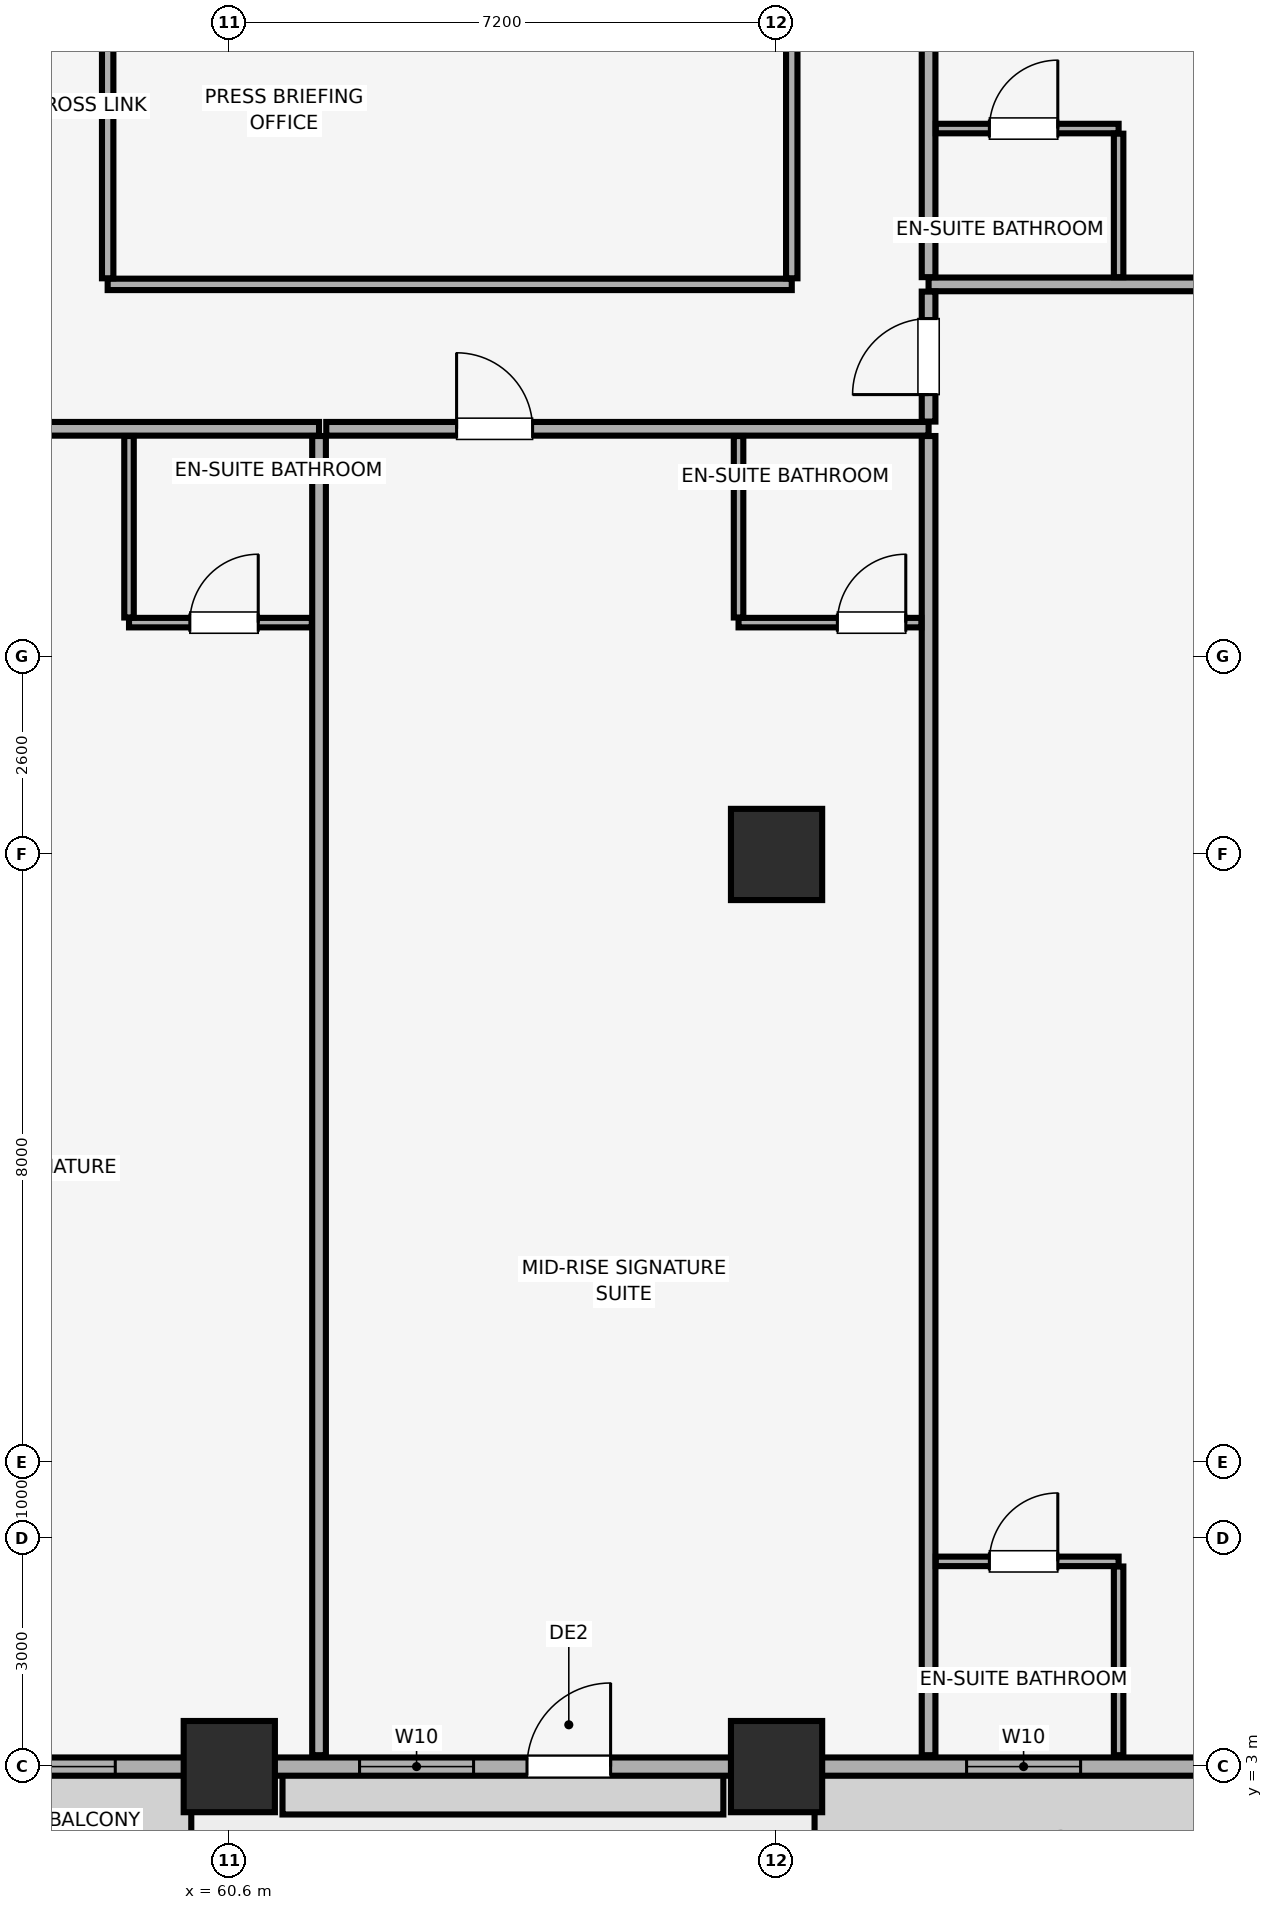
"""IFC4 building model, lengths in metres.
Left out: names, types, materials, properties, quantities, classifications, styles, units other than length and angle.
Written with IfcOpenShell. Run it as: python <this file> out.ifc"""

import sys

from ifc_helpers import new_model, si_unit, direction, frame, frame_2d, origin, origin_2d, place, context, subcontext, project, spatial, rectangle, extrude, element, fill, save


model = new_model("IFC4")
c1 = context("Model", 3, precision=1e-05, world=origin(), true_north=direction((0.0, 1.0)))
c2 = subcontext(c1, "Body", "Model", "MODEL_VIEW")
j1 = project(units=[si_unit("LENGTHUNIT", "METRE"), si_unit("PLANEANGLEUNIT", "RADIAN")], contexts=[c1])
p1 = place(None, origin())
s1 = spatial("IfcSite", under=j1, at=p1, CompositionType="ELEMENT")
p2 = place(p1, origin())
s2 = spatial("IfcBuilding", under=s1, at=p2, CompositionType="ELEMENT")
p3 = place(p2, frame((0.0, 0.0, 180.95)))
s3 = spatial("IfcBuildingStorey", under=s2, at=p3, CompositionType="ELEMENT", Elevation=180.95)
for number, where, z_axis, x_axis in (
    (1, (60.6, 3.0, 0.0), (0.0, 0.0, 1.0), (1.0, 0.0, 0.0)),
    (2, (67.8, 3.0, 0.0), (0.0, 0.0, 1.0), (1.0, 0.0, 0.0)),
    (3, (67.8, 15.0, 0.0), (0.0, 0.0, 1.0), (1.0, 0.0, 0.0)),
):
    element("IfcColumn", number, at=place(p3, frame(where, z_axis=z_axis, x_axis=x_axis)), inside=s3, PredefinedType="COLUMN", context=c2, shape_type="SweptSolid", body=[
        extrude(rectangle(XDim=1.2, YDim=1.2, at=origin_2d()), origin(), (0.0, 0.0, 1.0), 3.45),
    ])
p4 = place(p3, frame((7.0, 3.0, 0.0), z_axis=(0.0, 0.0, 1.0), x_axis=(1.0, 0.0, 0.0)))
e4 = element("IfcWall", 4, at=p4, inside=s3, PredefinedType="SOLIDWALL", context=c2, shape_type="SweptSolid", body=[
    extrude(rectangle(XDim=70.0, YDim=0.24, at=frame_2d((35.0, 0.0))), origin(), (0.0, 0.0, 1.0), 2.65),
])
p5 = place(p4, frame((11.383, 0.0, 0.0)))
e5 = element("IfcOpeningElement", 5, at=p5, cuts=e4, PredefinedType="OPENING", context=c2, shape_type="SweptSolid", body=[
    extrude(rectangle(XDim=1.1, YDim=2.15, at=frame_2d((0.55, 1.075))), frame((0.0, 0.13, 0.0), z_axis=(0.0, -1.0, 0.0), x_axis=(1.0, 0.0, 0.0)), (0.0, 0.0, 1.0), 0.26),
])
p6 = place(p4, frame((34.45, 0.0, 0.0)))
e6 = element("IfcOpeningElement", 6, at=p6, cuts=e4, PredefinedType="OPENING", context=c2, shape_type="SweptSolid", body=[
    extrude(rectangle(XDim=1.1, YDim=2.15, at=frame_2d((0.55, 1.075))), frame((0.0, 0.13, 0.0), z_axis=(0.0, -1.0, 0.0), x_axis=(1.0, 0.0, 0.0)), (0.0, 0.0, 1.0), 0.26),
])
p7 = place(p4, frame((57.517, 0.0, 0.0)))
e7 = element("IfcOpeningElement", 7, at=p7, cuts=e4, PredefinedType="OPENING", context=c2, shape_type="SweptSolid", body=[
    extrude(rectangle(XDim=1.1, YDim=2.15, at=frame_2d((0.55, 1.075))), frame((0.0, 0.13, 0.0), z_axis=(0.0, -1.0, 0.0), x_axis=(1.0, 0.0, 0.0)), (0.0, 0.0, 1.0), 0.26),
])
p8 = place(p4, frame((5.2, 0.0, 0.85)))
e8 = element("IfcOpeningElement", 8, at=p8, cuts=e4, PredefinedType="OPENING", context=c2, shape_type="SweptSolid", body=[
    extrude(rectangle(XDim=1.5, YDim=1.4, at=frame_2d((0.75, 0.7))), frame((0.0, 0.13, 0.0), z_axis=(0.0, -1.0, 0.0), x_axis=(1.0, 0.0, 0.0)), (0.0, 0.0, 1.0), 0.26),
])
p9 = place(p4, frame((13.133, 0.0, 0.85)))
e9 = element("IfcOpeningElement", 9, at=p9, cuts=e4, PredefinedType="OPENING", context=c2, shape_type="SweptSolid", body=[
    extrude(rectangle(XDim=1.5, YDim=1.4, at=frame_2d((0.75, 0.7))), frame((0.0, 0.13, 0.0), z_axis=(0.0, -1.0, 0.0), x_axis=(1.0, 0.0, 0.0)), (0.0, 0.0, 1.0), 0.26),
])
p10 = place(p4, frame((17.812, 0.0, 0.85)))
e10 = element("IfcOpeningElement", 10, at=p10, cuts=e4, PredefinedType="OPENING", context=c2, shape_type="SweptSolid", body=[
    extrude(rectangle(XDim=4.2, YDim=1.65, at=frame_2d((2.1, 0.825))), frame((0.0, 0.13, 0.0), z_axis=(0.0, -1.0, 0.0), x_axis=(1.0, 0.0, 0.0)), (0.0, 0.0, 1.0), 0.26),
])
p11 = place(p4, frame((25.1, 0.0, 0.85)))
e11 = element("IfcOpeningElement", 11, at=p11, cuts=e4, PredefinedType="OPENING", context=c2, shape_type="SweptSolid", body=[
    extrude(rectangle(XDim=4.2, YDim=1.65, at=frame_2d((2.1, 0.825))), frame((0.0, 0.13, 0.0), z_axis=(0.0, -1.0, 0.0), x_axis=(1.0, 0.0, 0.0)), (0.0, 0.0, 1.0), 0.26),
])
p12 = place(p4, frame((31.99, 0.0, 0.85)))
e12 = element("IfcOpeningElement", 12, at=p12, cuts=e4, PredefinedType="OPENING", context=c2, shape_type="SweptSolid", body=[
    extrude(rectangle(XDim=1.5, YDim=1.4, at=frame_2d((0.75, 0.7))), frame((0.0, 0.13, 0.0), z_axis=(0.0, -1.0, 0.0), x_axis=(1.0, 0.0, 0.0)), (0.0, 0.0, 1.0), 0.26),
])
p13 = place(p4, frame((36.51, 0.0, 0.85)))
e13 = element("IfcOpeningElement", 13, at=p13, cuts=e4, PredefinedType="OPENING", context=c2, shape_type="SweptSolid", body=[
    extrude(rectangle(XDim=1.5, YDim=1.4, at=frame_2d((0.75, 0.7))), frame((0.0, 0.13, 0.0), z_axis=(0.0, -1.0, 0.0), x_axis=(1.0, 0.0, 0.0)), (0.0, 0.0, 1.0), 0.26),
])
p14 = place(p4, frame((40.7, 0.0, 0.85)))
e14 = element("IfcOpeningElement", 14, at=p14, cuts=e4, PredefinedType="OPENING", context=c2, shape_type="SweptSolid", body=[
    extrude(rectangle(XDim=4.2, YDim=1.65, at=frame_2d((2.1, 0.825))), frame((0.0, 0.13, 0.0), z_axis=(0.0, -1.0, 0.0), x_axis=(1.0, 0.0, 0.0)), (0.0, 0.0, 1.0), 0.26),
])
p15 = place(p4, frame((47.9, 0.0, 0.85)))
e15 = element("IfcOpeningElement", 15, at=p15, cuts=e4, PredefinedType="OPENING", context=c2, shape_type="SweptSolid", body=[
    extrude(rectangle(XDim=4.2, YDim=1.65, at=frame_2d((2.1, 0.825))), frame((0.0, 0.13, 0.0), z_axis=(0.0, -1.0, 0.0), x_axis=(1.0, 0.0, 0.0)), (0.0, 0.0, 1.0), 0.26),
])
p16 = place(p4, frame((55.314, 0.0, 0.85)))
e16 = element("IfcOpeningElement", 16, at=p16, cuts=e4, PredefinedType="OPENING", context=c2, shape_type="SweptSolid", body=[
    extrude(rectangle(XDim=1.5, YDim=1.4, at=frame_2d((0.75, 0.7))), frame((0.0, 0.13, 0.0), z_axis=(0.0, -1.0, 0.0), x_axis=(1.0, 0.0, 0.0)), (0.0, 0.0, 1.0), 0.26),
])
p17 = place(p4, frame((63.3, 0.0, 0.85)))
e17 = element("IfcOpeningElement", 17, at=p17, cuts=e4, PredefinedType="OPENING", context=c2, shape_type="SweptSolid", body=[
    extrude(rectangle(XDim=1.5, YDim=1.4, at=frame_2d((0.75, 0.7))), frame((0.0, 0.13, 0.0), z_axis=(0.0, -1.0, 0.0), x_axis=(1.0, 0.0, 0.0)), (0.0, 0.0, 1.0), 0.26),
])
p18 = place(p3, frame((53.856, 20.6, 0.0), z_axis=(0.0, 0.0, 1.0), x_axis=(1.0, 0.0, 0.0)))
e18 = element("IfcWall", 18, at=p18, inside=s3, PredefinedType="PARTITIONING", context=c2, shape_type="SweptSolid", body=[
    extrude(rectangle(XDim=7.924, YDim=0.18, at=frame_2d((3.962, 0.0))), origin(), (0.0, 0.0, 1.0), 3.45),
])
p19 = place(p18, frame((1.924, 0.0, 0.0)))
e19 = element("IfcOpeningElement", 19, at=p19, cuts=e18, PredefinedType="OPENING", context=c2, shape_type="SweptSolid", body=[
    extrude(rectangle(XDim=1.0, YDim=2.15, at=frame_2d((0.5, 1.075))), frame((0.0, 0.1, 0.0), z_axis=(0.0, -1.0, 0.0), x_axis=(1.0, 0.0, 0.0)), (0.0, 0.0, 1.0), 0.2),
])
p20 = place(p3, frame((61.781, 3.15, 0.0), z_axis=(0.0, 0.0, 1.0), x_axis=(0.0, 1.0, 0.0)))
e20 = element("IfcWall", 20, at=p20, inside=s3, PredefinedType="PARTITIONING", context=c2, shape_type="SweptSolid", body=[
    extrude(rectangle(XDim=17.355, YDim=0.18, at=frame_2d((8.677, 0.0))), origin(), (0.0, 0.0, 1.0), 3.45),
])
p21 = place(p3, frame((59.281, 18.05, 0.0), z_axis=(0.0, 0.0, 1.0), x_axis=(1.0, 0.0, 0.0)))
e21 = element("IfcWall", 21, at=p21, inside=s3, PredefinedType="PARTITIONING", context=c2, shape_type="SweptSolid", body=[
    extrude(rectangle(XDim=2.405, YDim=0.125, at=frame_2d((1.203, 0.0))), origin(), (0.0, 0.0, 1.0), 3.45),
])
p22 = place(p21, frame((0.8, 0.0, 0.0)))
e22 = element("IfcOpeningElement", 22, at=p22, cuts=e21, PredefinedType="OPENING", context=c2, shape_type="SweptSolid", body=[
    extrude(rectangle(XDim=0.9, YDim=2.1, at=frame_2d((0.45, 1.05))), frame((0.0, 0.073, 0.0), z_axis=(0.0, -1.0, 0.0), x_axis=(1.0, 0.0, 0.0)), (0.0, 0.0, 1.0), 0.145),
])
p23 = place(p3, frame((59.281, 18.117, 0.0), z_axis=(0.0, 0.0, 1.0), x_axis=(0.0, 1.0, 0.0)))
e23 = element("IfcWall", 23, at=p23, inside=s3, PredefinedType="PARTITIONING", context=c2, shape_type="SweptSolid", body=[
    extrude(rectangle(XDim=2.387, YDim=0.125, at=frame_2d((1.194, 0.0))), origin(), (0.0, 0.0, 1.0), 3.45),
])
p24 = place(p3, frame((61.876, 20.6, 0.0), z_axis=(0.0, 0.0, 1.0), x_axis=(1.0, 0.0, 0.0)))
e24 = element("IfcWall", 24, at=p24, inside=s3, PredefinedType="PARTITIONING", context=c2, shape_type="SweptSolid", body=[
    extrude(rectangle(XDim=7.924, YDim=0.18, at=frame_2d((3.962, 0.0))), origin(), (0.0, 0.0, 1.0), 3.45),
])
p25 = place(p24, frame((1.715, 0.0, 0.0)))
e25 = element("IfcOpeningElement", 25, at=p25, cuts=e24, PredefinedType="OPENING", context=c2, shape_type="SweptSolid", body=[
    extrude(rectangle(XDim=1.0, YDim=2.15, at=frame_2d((0.5, 1.075))), frame((0.0, 0.1, 0.0), z_axis=(0.0, -1.0, 0.0), x_axis=(1.0, 0.0, 0.0)), (0.0, 0.0, 1.0), 0.2),
])
p26 = place(p3, frame((69.8, 3.15, 0.0), z_axis=(0.0, 0.0, 1.0), x_axis=(0.0, 1.0, 0.0)))
e26 = element("IfcWall", 26, at=p26, inside=s3, PredefinedType="PARTITIONING", context=c2, shape_type="SweptSolid", body=[
    extrude(rectangle(XDim=17.355, YDim=0.18, at=frame_2d((8.677, 0.0))), origin(), (0.0, 0.0, 1.0), 3.45),
])
p27 = place(p3, frame((67.3, 18.05, 0.0), z_axis=(0.0, 0.0, 1.0), x_axis=(1.0, 0.0, 0.0)))
e27 = element("IfcWall", 27, at=p27, inside=s3, PredefinedType="PARTITIONING", context=c2, shape_type="SweptSolid", body=[
    extrude(rectangle(XDim=2.405, YDim=0.125, at=frame_2d((1.203, 0.0))), origin(), (0.0, 0.0, 1.0), 3.45),
])
p28 = place(p27, frame((1.3, 0.0, 0.0)))
e28 = element("IfcOpeningElement", 28, at=p28, cuts=e27, PredefinedType="OPENING", context=c2, shape_type="SweptSolid", body=[
    extrude(rectangle(XDim=0.9, YDim=2.1, at=frame_2d((0.45, 1.05))), frame((0.0, 0.073, 0.0), z_axis=(0.0, -1.0, 0.0), x_axis=(1.0, 0.0, 0.0)), (0.0, 0.0, 1.0), 0.145),
])
p29 = place(p3, frame((67.3, 18.117, 0.0), z_axis=(0.0, 0.0, 1.0), x_axis=(0.0, 1.0, 0.0)))
e29 = element("IfcWall", 29, at=p29, inside=s3, PredefinedType="PARTITIONING", context=c2, shape_type="SweptSolid", body=[
    extrude(rectangle(XDim=2.387, YDim=0.125, at=frame_2d((1.194, 0.0))), origin(), (0.0, 0.0, 1.0), 3.45),
])
p30 = place(p3, frame((69.8, 22.5, 0.0), z_axis=(0.0, 0.0, 1.0), x_axis=(1.0, 0.0, 0.0)))
e30 = element("IfcWall", 30, at=p30, inside=s3, PredefinedType="PARTITIONING", context=c2, shape_type="SweptSolid", body=[
    extrude(rectangle(XDim=11.05, YDim=0.18, at=frame_2d((5.525, 0.0))), origin(), (0.0, 0.0, 1.0), 3.45),
])
p31 = place(p3, frame((69.8, 20.695, 0.0), z_axis=(0.0, 0.0, 1.0), x_axis=(0.0, 1.0, 0.0)))
e31 = element("IfcWall", 31, at=p31, inside=s3, PredefinedType="PARTITIONING", context=c2, shape_type="SweptSolid", body=[
    extrude(rectangle(XDim=1.71, YDim=0.18, at=frame_2d((0.855, 0.0))), origin(), (0.0, 0.0, 1.0), 3.45),
])
p32 = place(p31, frame((0.355, 0.0, 0.0)))
e32 = element("IfcOpeningElement", 32, at=p32, cuts=e31, PredefinedType="OPENING", context=c2, shape_type="SweptSolid", body=[
    extrude(rectangle(XDim=1.0, YDim=2.15, at=frame_2d((0.5, 1.075))), frame((0.0, 0.1, 0.0), z_axis=(0.0, -1.0, 0.0), x_axis=(1.0, 0.0, 0.0)), (0.0, 0.0, 1.0), 0.2),
])
p33 = place(p3, frame((69.895, 5.7, 0.0), z_axis=(0.0, 0.0, 1.0), x_axis=(1.0, 0.0, 0.0)))
e33 = element("IfcWall", 33, at=p33, inside=s3, PredefinedType="PARTITIONING", context=c2, shape_type="SweptSolid", body=[
    extrude(rectangle(XDim=2.405, YDim=0.125, at=frame_2d((1.203, 0.0))), origin(), (0.0, 0.0, 1.0), 3.45),
])
p34 = place(p33, frame((0.705, 0.0, 0.0)))
e34 = element("IfcOpeningElement", 34, at=p34, cuts=e33, PredefinedType="OPENING", context=c2, shape_type="SweptSolid", body=[
    extrude(rectangle(XDim=0.9, YDim=2.1, at=frame_2d((0.45, 1.05))), frame((0.0, 0.073, 0.0), z_axis=(0.0, -1.0, 0.0), x_axis=(1.0, 0.0, 0.0)), (0.0, 0.0, 1.0), 0.145),
])
p35 = place(p3, frame((72.3, 3.15, 0.0), z_axis=(0.0, 0.0, 1.0), x_axis=(0.0, 1.0, 0.0)))
e35 = element("IfcWall", 35, at=p35, inside=s3, PredefinedType="PARTITIONING", context=c2, shape_type="SweptSolid", body=[
    extrude(rectangle(XDim=2.483, YDim=0.125, at=frame_2d((1.241, 0.0))), origin(), (0.0, 0.0, 1.0), 3.45),
])
p36 = place(p3, frame((69.8, 22.595, 0.0), z_axis=(0.0, 0.0, 1.0), x_axis=(0.0, 1.0, 0.0)))
e36 = element("IfcWall", 36, at=p36, inside=s3, PredefinedType="PARTITIONING", context=c2, shape_type="SweptSolid", body=[
    extrude(rectangle(XDim=6.71, YDim=0.18, at=frame_2d((3.355, 0.0))), origin(), (0.0, 0.0, 1.0), 3.45),
])
p37 = place(p36, frame((3.94, 0.0, 0.0)))
e37 = element("IfcOpeningElement", 37, at=p37, cuts=e36, PredefinedType="OPENING", context=c2, shape_type="SweptSolid", body=[
    extrude(rectangle(XDim=1.0, YDim=2.15, at=frame_2d((0.5, 1.075))), frame((0.0, 0.1, 0.0), z_axis=(0.0, -1.0, 0.0), x_axis=(1.0, 0.0, 0.0)), (0.0, 0.0, 1.0), 0.2),
])
p38 = place(p3, frame((69.895, 24.55, 0.0), z_axis=(0.0, 0.0, 1.0), x_axis=(1.0, 0.0, 0.0)))
e38 = element("IfcWall", 38, at=p38, inside=s3, PredefinedType="PARTITIONING", context=c2, shape_type="SweptSolid", body=[
    extrude(rectangle(XDim=2.405, YDim=0.125, at=frame_2d((1.203, 0.0))), origin(), (0.0, 0.0, 1.0), 3.45),
])
p39 = place(p38, frame((0.705, 0.0, 0.0)))
e39 = element("IfcOpeningElement", 39, at=p39, cuts=e38, PredefinedType="OPENING", context=c2, shape_type="SweptSolid", body=[
    extrude(rectangle(XDim=0.9, YDim=2.1, at=frame_2d((0.45, 1.05))), frame((0.0, 0.073, 0.0), z_axis=(0.0, -1.0, 0.0), x_axis=(1.0, 0.0, 0.0)), (0.0, 0.0, 1.0), 0.145),
])
p40 = place(p3, frame((72.3, 22.595, 0.0), z_axis=(0.0, 0.0, 1.0), x_axis=(0.0, 1.0, 0.0)))
e40 = element("IfcWall", 40, at=p40, inside=s3, PredefinedType="PARTITIONING", context=c2, shape_type="SweptSolid", body=[
    extrude(rectangle(XDim=1.887, YDim=0.125, at=frame_2d((0.944, 0.0))), origin(), (0.0, 0.0, 1.0), 3.45),
])
p41 = place(p3, frame((59.0, 22.5, 0.0), z_axis=(0.0, 0.0, 1.0), x_axis=(1.0, 0.0, 0.0)))
e41 = element("IfcWall", 41, at=p41, inside=s3, PredefinedType="PARTITIONING", context=c2, shape_type="SweptSolid", body=[
    extrude(rectangle(XDim=9.0, YDim=0.15, at=frame_2d((4.5, 0.0))), origin(), (0.0, 0.0, 1.0), 3.45),
])
p42 = place(p3, frame((59.0, 22.58, 0.0), z_axis=(0.0, 0.0, 1.0), x_axis=(0.0, 1.0, 0.0)))
e42 = element("IfcWall", 42, at=p42, inside=s3, PredefinedType="PARTITIONING", context=c2, shape_type="SweptSolid", body=[
    extrude(rectangle(XDim=4.54, YDim=0.15, at=frame_2d((2.27, 0.0))), origin(), (0.0, 0.0, 1.0), 3.45),
])
p43 = place(p3, frame((68.0, 22.58, 0.0), z_axis=(0.0, 0.0, 1.0), x_axis=(0.0, 1.0, 0.0)))
e43 = element("IfcWall", 43, at=p43, inside=s3, PredefinedType="PARTITIONING", context=c2, shape_type="SweptSolid", body=[
    extrude(rectangle(XDim=4.54, YDim=0.15, at=frame_2d((2.27, 0.0))), origin(), (0.0, 0.0, 1.0), 2.95),
])
p44 = place(p7, origin())
e44 = element("IfcDoor", 44, at=p44, inside=s3, OperationType="SINGLE_SWING_RIGHT", PredefinedType="DOOR", context=c2, shape_type="SweptSolid", body=[
    extrude(rectangle(XDim=1.1, YDim=2.15, at=frame_2d((0.55, 1.075))), frame((0.0, 0.025, 0.0), z_axis=(0.0, -1.0, 0.0), x_axis=(1.0, 0.0, 0.0)), (0.0, 0.0, 1.0), 0.05),
])
fill(e7, e44)
p45 = place(p15, origin())
e45 = element("IfcWindow", 45, at=p45, inside=s3, PartitioningType="SINGLE_PANEL", PredefinedType="WINDOW", context=c2, shape_type="SweptSolid", body=[
    extrude(rectangle(XDim=4.2, YDim=1.65, at=frame_2d((2.1, 0.825))), frame((0.0, 0.03, 0.0), z_axis=(0.0, -1.0, 0.0), x_axis=(1.0, 0.0, 0.0)), (0.0, 0.0, 1.0), 0.06),
])
fill(e15, e45)
p46 = place(p16, origin())
e46 = element("IfcWindow", 46, at=p46, inside=s3, PartitioningType="SINGLE_PANEL", PredefinedType="WINDOW", context=c2, shape_type="SweptSolid", body=[
    extrude(rectangle(XDim=1.5, YDim=1.4, at=frame_2d((0.75, 0.7))), frame((0.0, 0.03, 0.0), z_axis=(0.0, -1.0, 0.0), x_axis=(1.0, 0.0, 0.0)), (0.0, 0.0, 1.0), 0.06),
])
fill(e16, e46)
p47 = place(p17, origin())
e47 = element("IfcWindow", 47, at=p47, inside=s3, PartitioningType="SINGLE_PANEL", PredefinedType="WINDOW", context=c2, shape_type="SweptSolid", body=[
    extrude(rectangle(XDim=1.5, YDim=1.4, at=frame_2d((0.75, 0.7))), frame((0.0, 0.03, 0.0), z_axis=(0.0, -1.0, 0.0), x_axis=(1.0, 0.0, 0.0)), (0.0, 0.0, 1.0), 0.06),
])
fill(e17, e47)
p48 = place(p22, origin())
e48 = element("IfcDoor", 48, at=p48, inside=s3, OperationType="SINGLE_SWING_RIGHT", PredefinedType="DOOR", context=c2, shape_type="SweptSolid", body=[
    extrude(rectangle(XDim=0.9, YDim=2.1, at=frame_2d((0.45, 1.05))), frame((0.0, 0.025, 0.0), z_axis=(0.0, -1.0, 0.0), x_axis=(1.0, 0.0, 0.0)), (0.0, 0.0, 1.0), 0.05),
])
fill(e22, e48)
p49 = place(p25, origin())
e49 = element("IfcDoor", 49, at=p49, inside=s3, OperationType="SINGLE_SWING_LEFT", PredefinedType="DOOR", context=c2, shape_type="SweptSolid", body=[
    extrude(rectangle(XDim=1.0, YDim=2.15, at=frame_2d((0.5, 1.075))), frame((0.0, 0.025, 0.0), z_axis=(0.0, -1.0, 0.0), x_axis=(1.0, 0.0, 0.0)), (0.0, 0.0, 1.0), 0.05),
])
fill(e25, e49)
p50 = place(p28, origin())
e50 = element("IfcDoor", 50, at=p50, inside=s3, OperationType="SINGLE_SWING_RIGHT", PredefinedType="DOOR", context=c2, shape_type="SweptSolid", body=[
    extrude(rectangle(XDim=0.9, YDim=2.1, at=frame_2d((0.45, 1.05))), frame((0.0, 0.025, 0.0), z_axis=(0.0, -1.0, 0.0), x_axis=(1.0, 0.0, 0.0)), (0.0, 0.0, 1.0), 0.05),
])
fill(e28, e50)
p51 = place(p32, origin())
e51 = element("IfcDoor", 51, at=p51, inside=s3, OperationType="SINGLE_SWING_LEFT", PredefinedType="DOOR", context=c2, shape_type="SweptSolid", body=[
    extrude(rectangle(XDim=1.0, YDim=2.15, at=frame_2d((0.5, 1.075))), frame((0.0, 0.025, 0.0), z_axis=(0.0, -1.0, 0.0), x_axis=(1.0, 0.0, 0.0)), (0.0, 0.0, 1.0), 0.05),
])
fill(e32, e51)
p52 = place(p34, origin())
e52 = element("IfcDoor", 52, at=p52, inside=s3, OperationType="SINGLE_SWING_RIGHT", PredefinedType="DOOR", context=c2, shape_type="SweptSolid", body=[
    extrude(rectangle(XDim=0.9, YDim=2.1, at=frame_2d((0.45, 1.05))), frame((0.0, 0.025, 0.0), z_axis=(0.0, -1.0, 0.0), x_axis=(1.0, 0.0, 0.0)), (0.0, 0.0, 1.0), 0.05),
])
fill(e34, e52)
p53 = place(p39, origin())
e53 = element("IfcDoor", 53, at=p53, inside=s3, OperationType="SINGLE_SWING_RIGHT", PredefinedType="DOOR", context=c2, shape_type="SweptSolid", body=[
    extrude(rectangle(XDim=0.9, YDim=2.1, at=frame_2d((0.45, 1.05))), frame((0.0, 0.025, 0.0), z_axis=(0.0, -1.0, 0.0), x_axis=(1.0, 0.0, 0.0)), (0.0, 0.0, 1.0), 0.05),
])
fill(e39, e53)
save(model, sys.argv[1])
